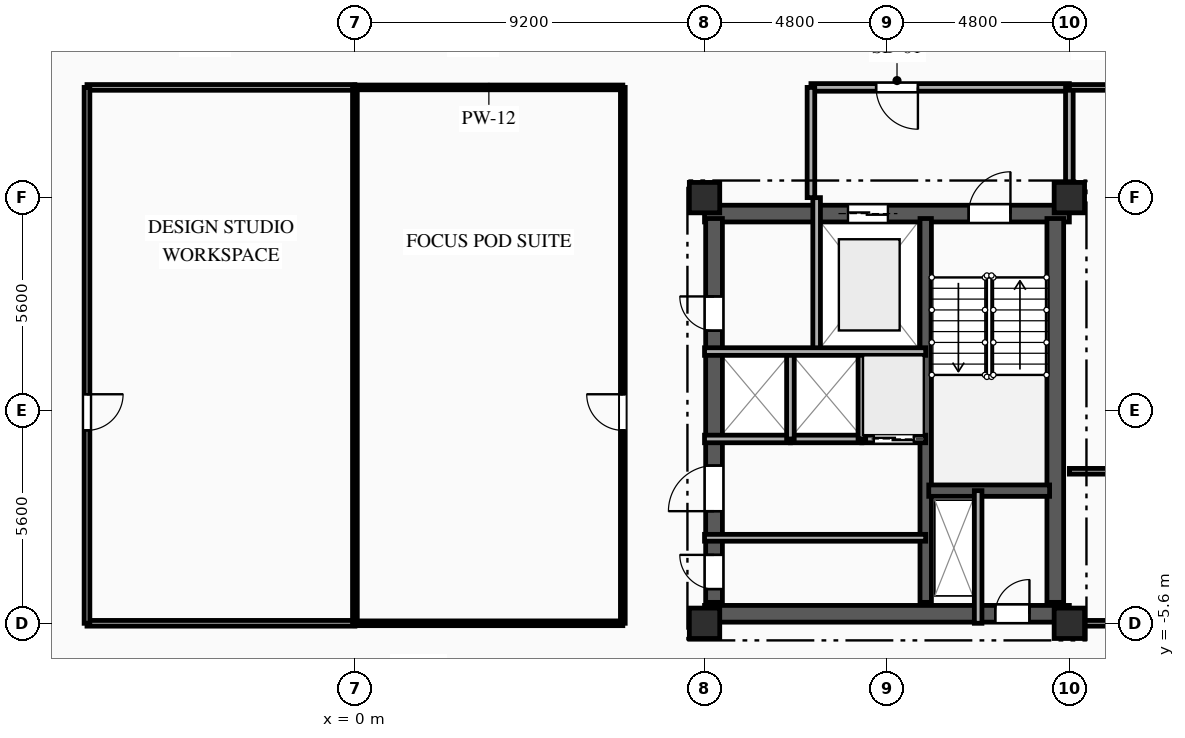
"""IFC4 building model, lengths in metres.
Left out: names, types, materials, properties, quantities, classifications, styles, units other than length and angle.
Written with IfcOpenShell. Run it as: python <this file> out.ifc"""

import sys

from ifc_helpers import new_model, si_unit, direction, frame, frame_2d, origin, origin_2d, place, context, subcontext, project, spatial, rectangle, extrude, element, fill, save


model = new_model("IFC4")
c1 = context("Model", 3, precision=1e-05, world=origin(), true_north=direction((0.0, 1.0)))
c2 = subcontext(c1, "Body", "Model", "MODEL_VIEW")
j1 = project(units=[si_unit("LENGTHUNIT", "METRE"), si_unit("PLANEANGLEUNIT", "RADIAN")], contexts=[c1])
p1 = place(None, origin())
s1 = spatial("IfcSite", under=j1, at=p1, CompositionType="ELEMENT")
p2 = place(p1, origin())
s2 = spatial("IfcBuilding", under=s1, at=p2, CompositionType="ELEMENT")
p3 = place(p2, frame((0.0, 0.0, 231.65)))
s3 = spatial("IfcBuildingStorey", under=s2, at=p3, CompositionType="ELEMENT", Elevation=231.65)
for number, where, z_axis, x_axis in (
    (1, (9.2, -5.6, 0.0), (0.0, 0.0, 1.0), (1.0, 0.0, 0.0)),
    (2, (9.2, 5.6, 0.0), (0.0, 0.0, 1.0), (1.0, 0.0, 0.0)),
    (3, (18.8, -5.6, 0.0), (0.0, 0.0, 1.0), (1.0, 0.0, 0.0)),
    (4, (18.8, 5.6, 0.0), (0.0, 0.0, 1.0), (1.0, 0.0, 0.0)),
):
    element("IfcColumn", number, at=place(p3, frame(where, z_axis=z_axis, x_axis=x_axis)), inside=s3, PredefinedType="COLUMN", context=c2, shape_type="SweptSolid", body=[
        extrude(rectangle(XDim=0.8, YDim=0.8, at=origin_2d()), origin(), (0.0, 0.0, 1.0), 3.35),
    ])
p4 = place(p3, frame((9.2, 5.18, 0.0), z_axis=(0.0, 0.0, 1.0), x_axis=(1.0, 0.0, 0.0)))
e5 = element("IfcWall", 5, at=p4, inside=s3, PredefinedType="SHEAR", context=c2, shape_type="SweptSolid", body=[
    extrude(rectangle(XDim=9.6, YDim=0.44, at=frame_2d((4.8, 0.0))), origin(), (0.0, 0.0, 1.0), 3.04),
])
p5 = place(p4, frame((6.95, 0.0, 0.0)))
e6 = element("IfcOpeningElement", 6, at=p5, cuts=e5, PredefinedType="OPENING", context=c2, shape_type="SweptSolid", body=[
    extrude(rectangle(XDim=1.1, YDim=2.15, at=frame_2d((0.55, 1.075))), frame((0.0, 0.23, 0.0), z_axis=(0.0, -1.0, 0.0), x_axis=(1.0, 0.0, 0.0)), (0.0, 0.0, 1.0), 0.46),
])
p6 = place(p4, frame((3.775, 0.0, 0.0)))
e7 = element("IfcOpeningElement", 7, at=p6, cuts=e5, PredefinedType="OPENING", context=c2, shape_type="SweptSolid", body=[
    extrude(rectangle(XDim=1.05, YDim=2.1, at=frame_2d((0.525, 1.05))), frame((0.0, 0.23, 0.0), z_axis=(0.0, -1.0, 0.0), x_axis=(1.0, 0.0, 0.0)), (0.0, 0.0, 1.0), 0.46),
])
p7 = place(p3, frame((9.2, -5.35, 0.0), z_axis=(0.0, 0.0, 1.0), x_axis=(1.0, 0.0, 0.0)))
e8 = element("IfcWall", 8, at=p7, inside=s3, PredefinedType="SHEAR", context=c2, shape_type="SweptSolid", body=[
    extrude(rectangle(XDim=9.6, YDim=0.44, at=frame_2d((4.8, 0.0))), origin(), (0.0, 0.0, 1.0), 3.04),
])
p8 = place(p7, frame((7.65, 0.0, 0.0)))
e9 = element("IfcOpeningElement", 9, at=p8, cuts=e8, PredefinedType="OPENING", context=c2, shape_type="SweptSolid", body=[
    extrude(rectangle(XDim=0.9, YDim=2.1, at=frame_2d((0.45, 1.05))), frame((0.0, 0.23, 0.0), z_axis=(0.0, -1.0, 0.0), x_axis=(1.0, 0.0, 0.0)), (0.0, 0.0, 1.0), 0.46),
])
p9 = place(p3, frame((9.45, -5.05, 0.0), z_axis=(0.0, 0.0, 1.0), x_axis=(0.0, 1.0, 0.0)))
e10 = element("IfcWall", 10, at=p9, inside=s3, PredefinedType="SHEAR", context=c2, shape_type="SweptSolid", body=[
    extrude(rectangle(XDim=10.1, YDim=0.44, at=frame_2d((5.05, 0.0))), origin(), (0.0, 0.0, 1.0), 3.04),
])
p10 = place(p9, frame((7.15, 0.0, 0.0)))
e11 = element("IfcOpeningElement", 11, at=p10, cuts=e10, PredefinedType="OPENING", context=c2, shape_type="SweptSolid", body=[
    extrude(rectangle(XDim=0.9, YDim=2.1, at=frame_2d((0.45, 1.05))), frame((0.0, 0.23, 0.0), z_axis=(0.0, -1.0, 0.0), x_axis=(1.0, 0.0, 0.0)), (0.0, 0.0, 1.0), 0.46),
])
p11 = place(p9, frame((2.4, 0.0, 0.0)))
e12 = element("IfcOpeningElement", 12, at=p11, cuts=e10, PredefinedType="OPENING", context=c2, shape_type="SweptSolid", body=[
    extrude(rectangle(XDim=1.2, YDim=2.15, at=frame_2d((0.6, 1.075))), frame((0.0, 0.23, 0.0), z_axis=(0.0, -1.0, 0.0), x_axis=(1.0, 0.0, 0.0)), (0.0, 0.0, 1.0), 0.46),
])
p12 = place(p9, frame((0.35, 0.0, 0.0)))
e13 = element("IfcOpeningElement", 13, at=p12, cuts=e10, PredefinedType="OPENING", context=c2, shape_type="SweptSolid", body=[
    extrude(rectangle(XDim=0.9, YDim=2.1, at=frame_2d((0.45, 1.05))), frame((0.0, 0.23, 0.0), z_axis=(0.0, -1.0, 0.0), x_axis=(1.0, 0.0, 0.0)), (0.0, 0.0, 1.0), 0.46),
])
p13 = place(p3, frame((18.43, -5.05, 0.0), z_axis=(0.0, 0.0, 1.0), x_axis=(0.0, 1.0, 0.0)))
e14 = element("IfcWall", 14, at=p13, inside=s3, PredefinedType="SHEAR", context=c2, shape_type="SweptSolid", body=[
    extrude(rectangle(XDim=10.1, YDim=0.44, at=frame_2d((5.05, 0.0))), origin(), (0.0, 0.0, 1.0), 3.04),
])
p14 = place(p3, frame((15.02, -5.05, 0.0), z_axis=(0.0, 0.0, 1.0), x_axis=(0.0, 1.0, 0.0)))
e15 = element("IfcWall", 15, at=p14, inside=s3, PredefinedType="SHEAR", context=c2, shape_type="SweptSolid", body=[
    extrude(rectangle(XDim=10.1, YDim=0.3, at=frame_2d((5.05, 0.0))), origin(), (0.0, 0.0, 1.0), 3.04),
])
p15 = place(p3, frame((15.1, -2.11, 0.0), z_axis=(0.0, 0.0, 1.0), x_axis=(1.0, 0.0, 0.0)))
e16 = element("IfcWall", 16, at=p15, inside=s3, PredefinedType="SHEAR", context=c2, shape_type="SweptSolid", body=[
    extrude(rectangle(XDim=3.18, YDim=0.3, at=frame_2d((1.59, 0.0))), origin(), (0.0, 0.0, 1.0), 3.04),
])
p16 = place(p3, frame((16.4, -2.11, 0.0), z_axis=(0.0, 0.0, 1.0), x_axis=(0.0, -1.0, 0.0)))
e17 = element("IfcWall", 17, at=p16, inside=s3, PredefinedType="PARTITIONING", context=c2, shape_type="SweptSolid", body=[
    extrude(rectangle(XDim=3.49, YDim=0.2, at=frame_2d((1.745, 0.0))), origin(), (0.0, 0.0, 1.0), 3.04),
])
p17 = place(p3, frame((12.15, 5.6, 0.0), z_axis=(0.0, 0.0, 1.0), x_axis=(0.0, -1.0, 0.0)))
e18 = element("IfcWall", 18, at=p17, inside=s3, PredefinedType="PARTITIONING", context=c2, shape_type="SweptSolid", body=[
    extrude(rectangle(XDim=4.05, YDim=0.2, at=frame_2d((2.025, 0.0))), origin(), (0.0, 0.0, 1.0), 3.04),
])
p18 = place(p3, frame((18.8, 8.5, 0.0), z_axis=(0.0, 0.0, 1.0), x_axis=(-1.0, 0.0, 0.0)))
e19 = element("IfcWall", 19, at=p18, inside=s3, PredefinedType="PARTITIONING", context=c2, shape_type="SweptSolid", body=[
    extrude(rectangle(XDim=6.8, YDim=0.2, at=frame_2d((3.4, 0.0))), origin(), (0.0, 0.0, 1.0), 3.04),
])
p19 = place(p18, frame((3.985, 0.0, 0.0)))
e20 = element("IfcOpeningElement", 20, at=p19, cuts=e19, PredefinedType="OPENING", context=c2, shape_type="SweptSolid", body=[
    extrude(rectangle(XDim=1.1, YDim=2.15, at=frame_2d((0.55, 1.075))), frame((0.0, 0.11, 0.0), z_axis=(0.0, -1.0, 0.0), x_axis=(1.0, 0.0, 0.0)), (0.0, 0.0, 1.0), 0.22),
])
p20 = place(p3, frame((12.0, 8.5, 0.0), z_axis=(0.0, 0.0, 1.0), x_axis=(0.0, -1.0, 0.0)))
e21 = element("IfcWall", 21, at=p20, inside=s3, PredefinedType="PARTITIONING", context=c2, shape_type="SweptSolid", body=[
    extrude(rectangle(XDim=2.9, YDim=0.2, at=frame_2d((1.45, 0.0))), origin(), (0.0, 0.0, 1.0), 3.04),
])
p21 = place(p3, frame((18.8, 5.6, 0.0), z_axis=(0.0, 0.0, 1.0), x_axis=(0.0, 1.0, 0.0)))
e22 = element("IfcWall", 22, at=p21, inside=s3, PredefinedType="PARTITIONING", context=c2, shape_type="SweptSolid", body=[
    extrude(rectangle(XDim=2.9, YDim=0.2, at=frame_2d((1.45, 0.0))), origin(), (0.0, 0.0, 1.0), 2.665),
])
p22 = place(p3, frame((9.2, -3.35, 0.0), z_axis=(0.0, 0.0, 1.0), x_axis=(1.0, 0.0, 0.0)))
e23 = element("IfcWall", 23, at=p22, inside=s3, PredefinedType="PARTITIONING", context=c2, shape_type="SweptSolid", body=[
    extrude(rectangle(XDim=5.82, YDim=0.18, at=frame_2d((2.91, 0.0))), origin(), (0.0, 0.0, 1.0), 2.755),
])
p23 = place(p3, frame((11.46, -0.75, 0.0), z_axis=(0.0, 0.0, 1.0), x_axis=(-1.0, 0.0, 0.0)))
e24 = element("IfcWall", 24, at=p23, inside=s3, PredefinedType="PARTITIONING", context=c2, shape_type="SweptSolid", body=[
    extrude(rectangle(XDim=2.26, YDim=0.2, at=frame_2d((1.13, 0.0))), origin(), (0.0, 0.0, 1.0), 3.04),
])
p24 = place(p3, frame((13.34, -0.75, 0.0), z_axis=(0.0, 0.0, 1.0), x_axis=(-1.0, 0.0, 0.0)))
e25 = element("IfcWall", 25, at=p24, inside=s3, PredefinedType="PARTITIONING", context=c2, shape_type="SweptSolid", body=[
    extrude(rectangle(XDim=1.88, YDim=0.2, at=frame_2d((0.94, 0.0))), origin(), (0.0, 0.0, 1.0), 3.04),
])
p25 = place(p3, frame((15.02, -0.75, 0.0), z_axis=(0.0, 0.0, 1.0), x_axis=(-1.0, 0.0, 0.0)))
e26 = element("IfcWall", 26, at=p25, inside=s3, PredefinedType="PARTITIONING", context=c2, shape_type="SweptSolid", body=[
    extrude(rectangle(XDim=1.68, YDim=0.2, at=frame_2d((0.84, 0.0))), origin(), (0.0, 0.0, 1.0), 3.04),
])
p26 = place(p25, frame((0.315, 0.0, 0.0)))
e27 = element("IfcOpeningElement", 27, at=p26, cuts=e26, PredefinedType="OPENING", context=c2, shape_type="SweptSolid", body=[
    extrude(rectangle(XDim=1.05, YDim=2.1, at=frame_2d((0.525, 1.05))), frame((0.0, 0.11, 0.0), z_axis=(0.0, -1.0, 0.0), x_axis=(1.0, 0.0, 0.0)), (0.0, 0.0, 1.0), 0.22),
])
for number, where, z_axis, x_axis in (
    (28, (11.46, -0.75, 0.0), (0.0, 0.0, 1.0), (0.0, 1.0, 0.0)),
    (29, (13.34, -0.75, 0.0), (0.0, 0.0, 1.0), (0.0, 1.0, 0.0)),
):
    element("IfcWall", number, at=place(p3, frame(where, z_axis=z_axis, x_axis=x_axis)), inside=s3, PredefinedType="PARTITIONING", context=c2, shape_type="SweptSolid", body=[
        extrude(rectangle(XDim=2.3, YDim=0.2, at=frame_2d((1.15, 0.0))), origin(), (0.0, 0.0, 1.0), 3.04),
    ])
p27 = place(p3, frame((0.0, 8.5, 0.0), z_axis=(0.0, 0.0, 1.0), x_axis=(-1.0, 0.0, 0.0)))
e30 = element("IfcWall", 30, at=p27, inside=s3, PredefinedType="PARTITIONING", context=c2, shape_type="SweptSolid", body=[
    extrude(rectangle(XDim=7.05, YDim=0.15, at=frame_2d((3.525, 0.0))), origin(), (0.0, 0.0, 1.0), 3.04),
])
p28 = place(p3, frame((20.5, 8.5, 0.0), z_axis=(0.0, 0.0, 1.0), x_axis=(-1.0, 0.0, 0.0)))
e31 = element("IfcWall", 31, at=p28, inside=s3, PredefinedType="PARTITIONING", context=c2, shape_type="SweptSolid", body=[
    extrude(rectangle(XDim=1.7, YDim=0.15, at=frame_2d((0.85, 0.0))), origin(), (0.0, 0.0, 1.0), 3.04),
])
p29 = place(p3, frame((7.05, 8.5, 0.0), z_axis=(0.0, 0.0, 1.0), x_axis=(-1.0, 0.0, 0.0)))
e32 = element("IfcWall", 32, at=p29, inside=s3, PredefinedType="PARTITIONING", context=c2, shape_type="SweptSolid", body=[
    extrude(rectangle(XDim=7.05, YDim=0.125, at=frame_2d((3.525, 0.0))), origin(), (0.0, 0.0, 1.0), 3.04),
])
p30 = place(p3, frame((-7.05, -5.6, 0.0), z_axis=(0.0, 0.0, 1.0), x_axis=(1.0, 0.0, 0.0)))
e33 = element("IfcWall", 33, at=p30, inside=s3, PredefinedType="PARTITIONING", context=c2, shape_type="SweptSolid", body=[
    extrude(rectangle(XDim=7.05, YDim=0.15, at=frame_2d((3.525, 0.0))), origin(), (0.0, 0.0, 1.0), 2.525),
])
p31 = place(p3, frame((18.8, -5.6, 0.0), z_axis=(0.0, 0.0, 1.0), x_axis=(1.0, 0.0, 0.0)))
e34 = element("IfcWall", 34, at=p31, inside=s3, PredefinedType="PARTITIONING", context=c2, shape_type="SweptSolid", body=[
    extrude(rectangle(XDim=1.7, YDim=0.15, at=frame_2d((0.85, 0.0))), origin(), (0.0, 0.0, 1.0), 3.04),
])
p32 = place(p3, frame((0.0, -5.6, 0.0), z_axis=(0.0, 0.0, 1.0), x_axis=(1.0, 0.0, 0.0)))
e35 = element("IfcWall", 35, at=p32, inside=s3, PredefinedType="PARTITIONING", context=c2, shape_type="SweptSolid", body=[
    extrude(rectangle(XDim=7.05, YDim=0.125, at=frame_2d((3.525, 0.0))), origin(), (0.0, 0.0, 1.0), 2.525),
])
p33 = place(p3, frame((-7.05, 8.5, 0.0), z_axis=(0.0, 0.0, 1.0), x_axis=(0.0, -1.0, 0.0)))
e36 = element("IfcWall", 36, at=p33, inside=s3, PredefinedType="PARTITIONING", context=c2, shape_type="SweptSolid", body=[
    extrude(rectangle(XDim=14.1, YDim=0.15, at=frame_2d((7.05, 0.0))), origin(), (0.0, 0.0, 1.0), 3.04),
])
p34 = place(p33, frame((8.074, 0.0, 0.0)))
e37 = element("IfcOpeningElement", 37, at=p34, cuts=e36, PredefinedType="OPENING", context=c2, shape_type="SweptSolid", body=[
    extrude(rectangle(XDim=0.95, YDim=2.1, at=frame_2d((0.475, 1.05))), frame((0.0, 0.085, 0.0), z_axis=(0.0, -1.0, 0.0), x_axis=(1.0, 0.0, 0.0)), (0.0, 0.0, 1.0), 0.17),
])
p35 = place(p3, frame((7.05, -5.6, 0.0), z_axis=(0.0, 0.0, 1.0), x_axis=(0.0, 1.0, 0.0)))
e38 = element("IfcWall", 38, at=p35, inside=s3, PredefinedType="PARTITIONING", context=c2, shape_type="SweptSolid", body=[
    extrude(rectangle(XDim=14.1, YDim=0.125, at=frame_2d((7.05, 0.0))), origin(), (0.0, 0.0, 1.0), 3.04),
])
p36 = place(p35, frame((5.076, 0.0, 0.0)))
e39 = element("IfcOpeningElement", 39, at=p36, cuts=e38, PredefinedType="OPENING", context=c2, shape_type="SweptSolid", body=[
    extrude(rectangle(XDim=0.95, YDim=2.1, at=frame_2d((0.475, 1.05))), frame((0.0, 0.073, 0.0), z_axis=(0.0, -1.0, 0.0), x_axis=(1.0, 0.0, 0.0)), (0.0, 0.0, 1.0), 0.145),
])
p37 = place(p3, frame((18.8, -1.6, 0.0), z_axis=(0.0, 0.0, 1.0), x_axis=(1.0, 0.0, 0.0)))
e40 = element("IfcWall", 40, at=p37, inside=s3, PredefinedType="PARTITIONING", context=c2, shape_type="SweptSolid", body=[
    extrude(rectangle(XDim=4.8, YDim=0.15, at=frame_2d((2.4, 0.0))), origin(), (0.0, 0.0, 1.0), 3.04),
])
p38 = place(p3, frame((0.0, 8.5, 0.0), z_axis=(0.0, 0.0, 1.0), x_axis=(0.0, -1.0, 0.0)))
e41 = element("IfcWall", 41, at=p38, inside=s3, PredefinedType="PARTITIONING", context=c2, shape_type="SweptSolid", body=[
    extrude(rectangle(XDim=14.1, YDim=0.125, at=frame_2d((7.05, 0.0))), origin(), (0.0, 0.0, 1.0), 3.04),
])
p39 = place(p3, frame((9.2, 1.55, 0.0), z_axis=(0.0, 0.0, 1.0), x_axis=(1.0, 0.0, 0.0)))
e42 = element("IfcWall", 42, at=p39, inside=s3, PredefinedType="PARTITIONING", context=c2, shape_type="SweptSolid", body=[
    extrude(rectangle(XDim=5.82, YDim=0.2, at=frame_2d((2.91, 0.0))), origin(), (0.0, 0.0, 1.0), 3.04),
])
p40 = place(p5, origin())
e43 = element("IfcDoor", 43, at=p40, inside=s3, OperationType="SINGLE_SWING_RIGHT", PredefinedType="DOOR", context=c2, shape_type="SweptSolid", body=[
    extrude(rectangle(XDim=1.1, YDim=2.15, at=frame_2d((0.55, 1.075))), frame((0.0, 0.025, 0.0), z_axis=(0.0, -1.0, 0.0), x_axis=(1.0, 0.0, 0.0)), (0.0, 0.0, 1.0), 0.05),
])
fill(e6, e43)
p41 = place(p6, origin())
e44 = element("IfcDoor", 44, at=p41, inside=s3, OperationType="DOUBLE_DOOR_SLIDING", PredefinedType="DOOR", context=c2, shape_type="SweptSolid", body=[
    extrude(rectangle(XDim=1.05, YDim=2.1, at=frame_2d((0.525, 1.05))), frame((0.0, 0.025, 0.0), z_axis=(0.0, -1.0, 0.0), x_axis=(1.0, 0.0, 0.0)), (0.0, 0.0, 1.0), 0.05),
])
fill(e7, e44)
p42 = place(p8, origin())
e45 = element("IfcDoor", 45, at=p42, inside=s3, OperationType="SINGLE_SWING_RIGHT", PredefinedType="DOOR", context=c2, shape_type="SweptSolid", body=[
    extrude(rectangle(XDim=0.9, YDim=2.1, at=frame_2d((0.45, 1.05))), frame((0.0, 0.025, 0.0), z_axis=(0.0, -1.0, 0.0), x_axis=(1.0, 0.0, 0.0)), (0.0, 0.0, 1.0), 0.05),
])
fill(e9, e45)
p43 = place(p19, origin())
e46 = element("IfcDoor", 46, at=p43, inside=s3, OperationType="SINGLE_SWING_LEFT", PredefinedType="DOOR", context=c2, shape_type="SweptSolid", body=[
    extrude(rectangle(XDim=1.1, YDim=2.15, at=frame_2d((0.55, 1.075))), frame((0.0, 0.025, 0.0), z_axis=(0.0, -1.0, 0.0), x_axis=(1.0, 0.0, 0.0)), (0.0, 0.0, 1.0), 0.05),
])
fill(e20, e46)
p44 = place(p10, origin())
e47 = element("IfcDoor", 47, at=p44, inside=s3, OperationType="SINGLE_SWING_RIGHT", PredefinedType="DOOR", context=c2, shape_type="SweptSolid", body=[
    extrude(rectangle(XDim=0.9, YDim=2.1, at=frame_2d((0.45, 1.05))), frame((0.0, 0.025, 0.0), z_axis=(0.0, -1.0, 0.0), x_axis=(1.0, 0.0, 0.0)), (0.0, 0.0, 1.0), 0.05),
])
fill(e11, e47)
p45 = place(p26, origin())
e48 = element("IfcDoor", 48, at=p45, inside=s3, OperationType="DOUBLE_DOOR_SLIDING", PredefinedType="DOOR", context=c2, shape_type="SweptSolid", body=[
    extrude(rectangle(XDim=1.05, YDim=2.1, at=frame_2d((0.525, 1.05))), frame((0.0, 0.025, 0.0), z_axis=(0.0, -1.0, 0.0), x_axis=(1.0, 0.0, 0.0)), (0.0, 0.0, 1.0), 0.05),
])
fill(e27, e48)
p46 = place(p11, origin())
e49 = element("IfcDoor", 49, at=p46, inside=s3, OperationType="SINGLE_SWING_LEFT", PredefinedType="DOOR", context=c2, shape_type="SweptSolid", body=[
    extrude(rectangle(XDim=1.2, YDim=2.15, at=frame_2d((0.6, 1.075))), frame((0.0, 0.025, 0.0), z_axis=(0.0, -1.0, 0.0), x_axis=(1.0, 0.0, 0.0)), (0.0, 0.0, 1.0), 0.05),
])
fill(e12, e49)
p47 = place(p12, origin())
e50 = element("IfcDoor", 50, at=p47, inside=s3, OperationType="SINGLE_SWING_RIGHT", PredefinedType="DOOR", context=c2, shape_type="SweptSolid", body=[
    extrude(rectangle(XDim=0.9, YDim=2.1, at=frame_2d((0.45, 1.05))), frame((0.0, 0.025, 0.0), z_axis=(0.0, -1.0, 0.0), x_axis=(1.0, 0.0, 0.0)), (0.0, 0.0, 1.0), 0.05),
])
fill(e13, e50)
p48 = place(p34, origin())
e51 = element("IfcDoor", 51, at=p48, inside=s3, OperationType="SINGLE_SWING_LEFT", PredefinedType="DOOR", context=c2, shape_type="SweptSolid", body=[
    extrude(rectangle(XDim=0.95, YDim=2.1, at=frame_2d((0.475, 1.05))), frame((0.0, 0.025, 0.0), z_axis=(0.0, -1.0, 0.0), x_axis=(1.0, 0.0, 0.0)), (0.0, 0.0, 1.0), 0.05),
])
fill(e37, e51)
p49 = place(p36, origin())
e52 = element("IfcDoor", 52, at=p49, inside=s3, OperationType="SINGLE_SWING_RIGHT", PredefinedType="DOOR", context=c2, shape_type="SweptSolid", body=[
    extrude(rectangle(XDim=0.95, YDim=2.1, at=frame_2d((0.475, 1.05))), frame((0.0, 0.025, 0.0), z_axis=(0.0, -1.0, 0.0), x_axis=(1.0, 0.0, 0.0)), (0.0, 0.0, 1.0), 0.05),
])
fill(e39, e52)
save(model, sys.argv[1])
